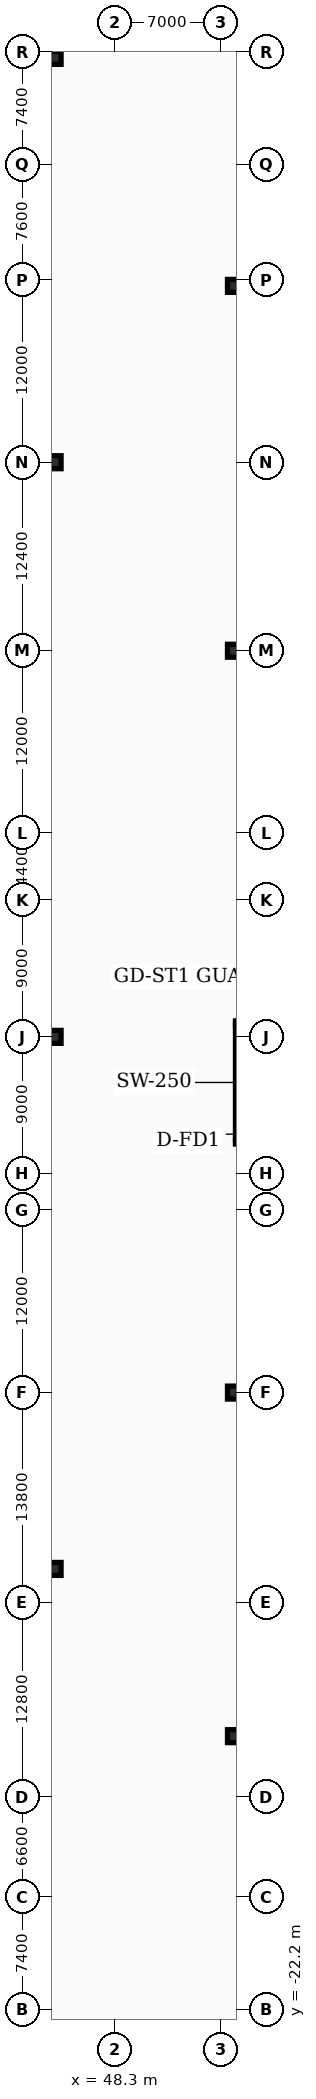
"""IFC4 building model, lengths in metres.
Left out: names, types, materials, properties, quantities, classifications, styles, units other than length and angle.
Written with IfcOpenShell. Run it as: python <this file> out.ifc"""

import sys

from ifc_helpers import new_model, si_unit, direction, frame, frame_2d, origin, origin_2d, place, context, subcontext, project, spatial, rectangle, extrude, element, save


model = new_model("IFC4")
c1 = context("Model", 3, precision=1e-05, world=origin(), true_north=direction((0.0, 1.0)))
c2 = subcontext(c1, "Body", "Model", "MODEL_VIEW")
j1 = project(units=[si_unit("LENGTHUNIT", "METRE"), si_unit("PLANEANGLEUNIT", "RADIAN")], contexts=[c1])
p1 = place(None, origin())
s1 = spatial("IfcSite", under=j1, at=p1, CompositionType="ELEMENT")
p2 = place(p1, origin())
s2 = spatial("IfcBuilding", under=s1, at=p2, CompositionType="ELEMENT")
p3 = place(p2, frame((0.0, 0.0, -7.2)))
s3 = spatial("IfcBuildingStorey", under=s2, at=p3, CompositionType="ELEMENT", Elevation=-7.2)
for number, where, z_axis, x_axis in (
    (1, (56.2, -4.2, 0.0), (0.0, 0.0, 1.0), (1.0, 0.0, 0.0)),
    (2, (56.2, 18.4, 0.0), (0.0, 0.0, 1.0), (1.0, 0.0, 0.0)),
    (3, (56.2, 67.2, 0.0), (0.0, 0.0, 1.0), (1.0, 0.0, 0.0)),
    (4, (56.2, 91.2, 0.0), (0.0, 0.0, 1.0), (1.0, 0.0, 0.0)),
    (5, (44.3, 6.8, 0.0), (0.0, 0.0, 1.0), (1.0, 0.0, 0.0)),
    (6, (44.3, 41.8, 0.0), (0.0, 0.0, 1.0), (1.0, 0.0, 0.0)),
    (7, (44.3, 79.6, 0.0), (0.0, 0.0, 1.0), (1.0, 0.0, 0.0)),
    (8, (44.3, 106.2, 0.0), (0.0, 0.0, 1.0), (1.0, 0.0, 0.0)),
):
    element("IfcColumn", number, at=place(p3, frame(where, z_axis=z_axis, x_axis=x_axis)), inside=s3, PredefinedType="COLUMN", context=c2, shape_type="SweptSolid", body=[
        extrude(rectangle(XDim=0.95, YDim=0.85, at=origin_2d()), origin(), (0.0, 0.0, 1.0), 3.6),
    ])
p4 = place(p3, frame((56.375, 35.0, 0.0), z_axis=(0.0, 0.0, 1.0), x_axis=(0.0, 1.0, 0.0)))
e9 = element("IfcWall", 9, at=p4, inside=s3, PredefinedType="SHEAR", context=c2, shape_type="SweptSolid", body=[
    extrude(rectangle(XDim=7.6, YDim=0.25, at=frame_2d((3.8, 0.0))), origin(), (0.0, 0.0, 1.0), 3.6),
])
for number, where, z_axis, x_axis in (
    (10, (56.25, 42.725, 0.0), (0.0, 0.0, 1.0), (1.0, 0.0, 0.0)),
    (11, (56.25, 34.875, 0.0), (0.0, 0.0, 1.0), (1.0, 0.0, 0.0)),
):
    element("IfcWall", number, at=place(p3, frame(where, z_axis=z_axis, x_axis=x_axis)), inside=s3, PredefinedType="SHEAR", context=c2, shape_type="SweptSolid", body=[
        extrude(rectangle(XDim=3.74, YDim=0.25, at=frame_2d((1.87, 0.0))), origin(), (0.0, 0.0, 1.0), 3.6),
    ])
save(model, sys.argv[1])
